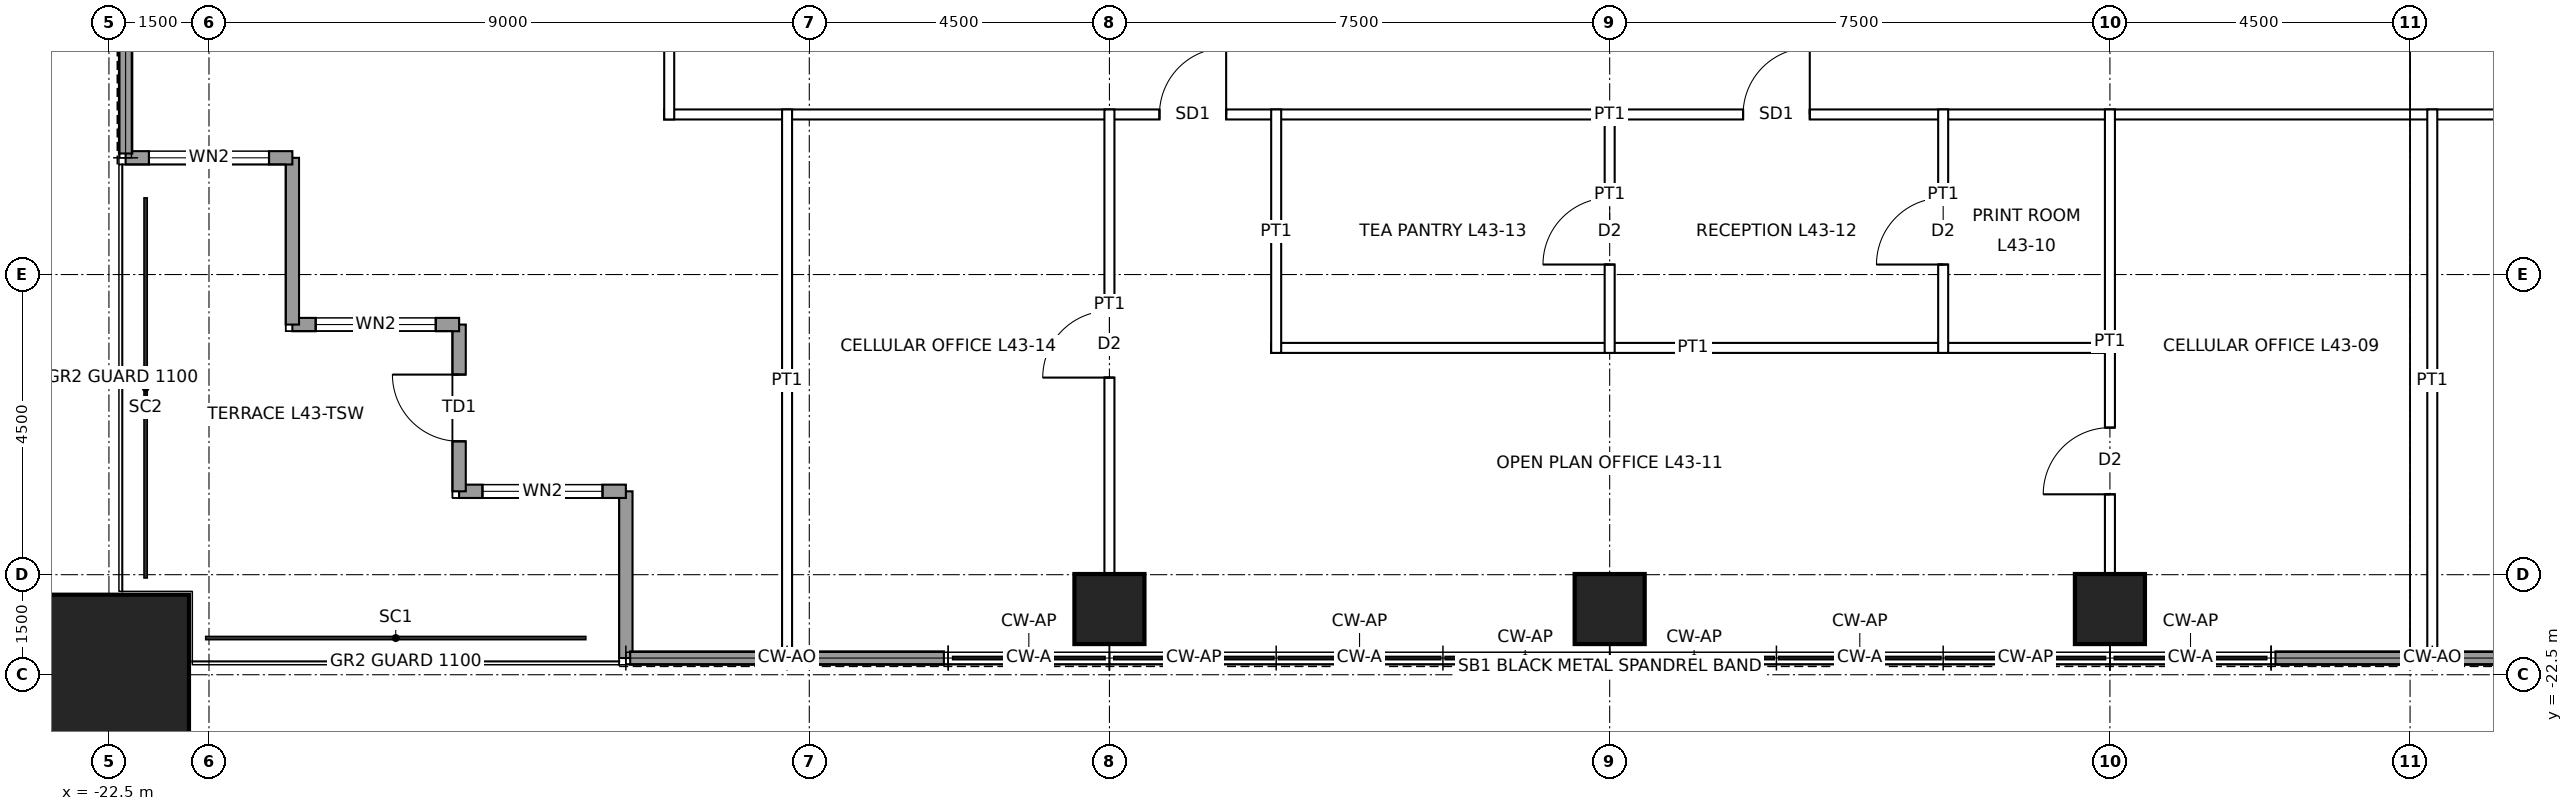
"""IFC4 building model, lengths in metres.
Left out: names, types, materials, properties, quantities, classifications, styles, units other than length and angle.
Written with IfcOpenShell. Run it as: python <this file> out.ifc"""

import sys

from ifc_helpers import new_model, si_unit, direction, frame, frame_2d, origin, origin_2d, place, context, subcontext, project, spatial, rectangle, hollow_rectangle, extrude, element, fill, save


model = new_model("IFC4")
c1 = context("Model", 3, precision=1e-05, world=origin(), true_north=direction((0.0, 1.0)))
c2 = subcontext(c1, "Body", "Model", "MODEL_VIEW")
j1 = project(units=[si_unit("LENGTHUNIT", "METRE"), si_unit("PLANEANGLEUNIT", "RADIAN")], contexts=[c1])
p1 = place(None, origin())
s1 = spatial("IfcSite", under=j1, at=p1, CompositionType="ELEMENT")
p2 = place(p1, origin())
s2 = spatial("IfcBuilding", under=s1, at=p2, CompositionType="ELEMENT")
p3 = place(p2, frame((0.0, 0.0, 205.9)))
s3 = spatial("IfcBuildingStorey", under=s2, at=p3, CompositionType="ELEMENT", Elevation=205.9)
p4 = place(p3, frame((-22.5, -22.5, 0.0), z_axis=(0.0, 0.0, 1.0), x_axis=(1.0, 0.0, 0.0)))
e1 = element("IfcColumn", 1, at=p4, inside=s3, PredefinedType="COLUMN", context=c2, shape_type="SweptSolid", body=[
    extrude(hollow_rectangle(XDim=2.4, YDim=2.4, WallThickness=0.12, at=origin_2d()), origin(), (0.0, 0.0, 1.0), 4.0),
])
for number, where, z_axis, x_axis in (
    (2, (7.5, -21.515, 0.0), (0.0, 0.0, 1.0), (1.0, 0.0, 0.0)),
    (3, (0.0, -21.515, 0.0), (0.0, 0.0, 1.0), (1.0, 0.0, 0.0)),
    (4, (-7.5, -21.515, 0.0), (0.0, 0.0, 1.0), (1.0, 0.0, 0.0)),
):
    element("IfcColumn", number, at=place(p3, frame(where, z_axis=z_axis, x_axis=x_axis)), inside=s3, PredefinedType="COLUMN", context=c2, shape_type="SweptSolid", body=[
        extrude(hollow_rectangle(XDim=1.05, YDim=1.05, WallThickness=0.07, at=origin_2d()), origin(), (0.0, 0.0, 1.0), 4.0),
    ])
p5 = place(p3, frame((-14.75, -22.25, 0.0), z_axis=(0.0, 0.0, 1.0), x_axis=(0.0, 1.0, 0.0)))
e5 = element("IfcWall", 5, at=p5, inside=s3, PredefinedType="SOLIDWALL", context=c2, shape_type="SweptSolid", body=[
    extrude(rectangle(XDim=2.5, YDim=0.2, at=frame_2d((1.25, 0.0))), origin(), (0.0, 0.0, 1.0), 3.85),
])
p6 = place(p3, frame((-14.75, -19.75, 0.0), z_axis=(0.0, 0.0, 1.0), x_axis=(-1.0, 0.0, 0.0)))
e6 = element("IfcWall", 6, at=p6, inside=s3, PredefinedType="SOLIDWALL", context=c2, shape_type="SweptSolid", body=[
    extrude(rectangle(XDim=2.5, YDim=0.2, at=frame_2d((1.25, 0.0))), origin(), (0.0, 0.0, 1.0), 3.85),
])
p7 = place(p6, frame((0.35, 0.0, 0.3)))
e7 = element("IfcOpeningElement", 7, at=p7, cuts=e6, PredefinedType="OPENING", context=c2, shape_type="SweptSolid", body=[
    extrude(rectangle(XDim=1.8, YDim=2.4, at=frame_2d((0.9, 1.2))), frame((0.0, 0.11, 0.0), z_axis=(0.0, -1.0, 0.0), x_axis=(1.0, 0.0, 0.0)), (0.0, 0.0, 1.0), 0.22),
])
p8 = place(p3, frame((-17.25, -19.75, 0.0), z_axis=(0.0, 0.0, 1.0), x_axis=(0.0, 1.0, 0.0)))
e8 = element("IfcWall", 8, at=p8, inside=s3, PredefinedType="SOLIDWALL", context=c2, shape_type="SweptSolid", body=[
    extrude(rectangle(XDim=2.5, YDim=0.2, at=frame_2d((1.25, 0.0))), origin(), (0.0, 0.0, 1.0), 3.85),
])
p9 = place(p8, frame((0.75, 0.0, 0.0)))
e9 = element("IfcOpeningElement", 9, at=p9, cuts=e8, PredefinedType="OPENING", context=c2, shape_type="SweptSolid", body=[
    extrude(rectangle(XDim=1.0, YDim=2.4, at=frame_2d((0.5, 1.2))), frame((0.0, 0.11, 0.0), z_axis=(0.0, -1.0, 0.0), x_axis=(1.0, 0.0, 0.0)), (0.0, 0.0, 1.0), 0.22),
])
p10 = place(p3, frame((-17.25, -17.25, 0.0), z_axis=(0.0, 0.0, 1.0), x_axis=(-1.0, 0.0, 0.0)))
e10 = element("IfcWall", 10, at=p10, inside=s3, PredefinedType="SOLIDWALL", context=c2, shape_type="SweptSolid", body=[
    extrude(rectangle(XDim=2.5, YDim=0.2, at=frame_2d((1.25, 0.0))), origin(), (0.0, 0.0, 1.0), 3.85),
])
p11 = place(p10, frame((0.35, 0.0, 0.3)))
e11 = element("IfcOpeningElement", 11, at=p11, cuts=e10, PredefinedType="OPENING", context=c2, shape_type="SweptSolid", body=[
    extrude(rectangle(XDim=1.8, YDim=2.4, at=frame_2d((0.9, 1.2))), frame((0.0, 0.11, 0.0), z_axis=(0.0, -1.0, 0.0), x_axis=(1.0, 0.0, 0.0)), (0.0, 0.0, 1.0), 0.22),
])
p12 = place(p3, frame((-19.75, -17.25, 0.0), z_axis=(0.0, 0.0, 1.0), x_axis=(0.0, 1.0, 0.0)))
e12 = element("IfcWall", 12, at=p12, inside=s3, PredefinedType="SOLIDWALL", context=c2, shape_type="SweptSolid", body=[
    extrude(rectangle(XDim=2.5, YDim=0.2, at=frame_2d((1.25, 0.0))), origin(), (0.0, 0.0, 1.0), 3.85),
])
p13 = place(p3, frame((-19.75, -14.75, 0.0), z_axis=(0.0, 0.0, 1.0), x_axis=(-1.0, 0.0, 0.0)))
e13 = element("IfcWall", 13, at=p13, inside=s3, PredefinedType="SOLIDWALL", context=c2, shape_type="SweptSolid", body=[
    extrude(rectangle(XDim=2.5, YDim=0.2, at=frame_2d((1.25, 0.0))), origin(), (0.0, 0.0, 1.0), 3.85),
])
p14 = place(p13, frame((0.35, 0.0, 0.3)))
e14 = element("IfcOpeningElement", 14, at=p14, cuts=e13, PredefinedType="OPENING", context=c2, shape_type="SweptSolid", body=[
    extrude(rectangle(XDim=1.8, YDim=2.4, at=frame_2d((0.9, 1.2))), frame((0.0, 0.11, 0.0), z_axis=(0.0, -1.0, 0.0), x_axis=(1.0, 0.0, 0.0)), (0.0, 0.0, 1.0), 0.22),
])
for number, where, z_axis, x_axis in (
    (15, (14.685, -22.25, 0.0), (0.0, 0.0, 1.0), (-1.0, 0.0, 0.0)),
    (16, (12.301, -22.25, 0.0), (0.0, 0.0, 1.0), (-1.0, 0.0, 0.0)),
    (17, (-9.982, -22.25, 0.0), (0.0, 0.0, 1.0), (-1.0, 0.0, 0.0)),
    (18, (-12.366, -22.25, 0.0), (0.0, 0.0, 1.0), (-1.0, 0.0, 0.0)),
    (19, (-22.25, -14.685, 0.0), (0.0, 0.0, 1.0), (0.0, 1.0, 0.0)),
):
    element("IfcWall", number, at=place(p3, frame(where, z_axis=z_axis, x_axis=x_axis)), inside=s3, PredefinedType="SOLIDWALL", context=c2, shape_type="SweptSolid", body=[
        extrude(rectangle(XDim=2.319, YDim=0.2, at=frame_2d((1.16, 0.0))), origin(), (0.0, 0.0, 1.0), 3.85),
    ])
p15 = place(p3, frame((-5.075, -17.6, 0.0), z_axis=(0.0, 0.0, 1.0), x_axis=(1.0, 0.0, 0.0)))
e20 = element("IfcWall", 20, at=p15, inside=s3, PredefinedType="PARTITIONING", context=c2, shape_type="SweptSolid", body=[
    extrude(rectangle(XDim=12.65, YDim=0.15, at=frame_2d((6.325, 0.0))), origin(), (0.0, 0.0, 1.0), 3.85),
])
p16 = place(p3, frame((-14.175, -14.1, 0.0), z_axis=(0.0, 0.0, 1.0), x_axis=(1.0, 0.0, 0.0)))
e21 = element("IfcWall", 21, at=p16, inside=s3, PredefinedType="PARTITIONING", context=c2, shape_type="SweptSolid", body=[
    extrude(rectangle(XDim=28.35, YDim=0.15, at=frame_2d((14.175, 0.0))), origin(), (0.0, 0.0, 1.0), 3.85),
])
p17 = place(p16, frame((7.425, 0.0, 0.0)))
e22 = element("IfcOpeningElement", 22, at=p17, cuts=e21, PredefinedType="OPENING", context=c2, shape_type="SweptSolid", body=[
    extrude(rectangle(XDim=1.0, YDim=2.4, at=frame_2d((0.5, 1.2))), frame((0.0, 0.085, 0.0), z_axis=(0.0, -1.0, 0.0), x_axis=(1.0, 0.0, 0.0)), (0.0, 0.0, 1.0), 0.17),
])
p18 = place(p16, frame((16.175, 0.0, 0.0)))
e23 = element("IfcOpeningElement", 23, at=p18, cuts=e21, PredefinedType="OPENING", context=c2, shape_type="SweptSolid", body=[
    extrude(rectangle(XDim=1.0, YDim=2.4, at=frame_2d((0.5, 1.2))), frame((0.0, 0.085, 0.0), z_axis=(0.0, -1.0, 0.0), x_axis=(1.0, 0.0, 0.0)), (0.0, 0.0, 1.0), 0.17),
])
p19 = place(p3, frame((-14.1, -14.175, 0.0), z_axis=(0.0, 0.0, 1.0), x_axis=(0.0, 1.0, 0.0)))
e24 = element("IfcWall", 24, at=p19, inside=s3, PredefinedType="PARTITIONING", context=c2, shape_type="SweptSolid", body=[
    extrude(rectangle(XDim=28.35, YDim=0.15, at=frame_2d((14.175, 0.0))), origin(), (0.0, 0.0, 1.0), 3.85),
])
p20 = place(p19, frame((12.075, 0.0, 0.0)))
e25 = element("IfcOpeningElement", 25, at=p20, cuts=e24, PredefinedType="OPENING", context=c2, shape_type="SweptSolid", body=[
    extrude(rectangle(XDim=1.0, YDim=2.4, at=frame_2d((0.5, 1.2))), frame((0.0, 0.085, 0.0), z_axis=(0.0, -1.0, 0.0), x_axis=(1.0, 0.0, 0.0)), (0.0, 0.0, 1.0), 0.17),
])
p21 = place(p19, frame((2.875, 0.0, 0.0)))
e26 = element("IfcOpeningElement", 26, at=p21, cuts=e24, PredefinedType="OPENING", context=c2, shape_type="SweptSolid", body=[
    extrude(rectangle(XDim=1.0, YDim=2.4, at=frame_2d((0.5, 1.2))), frame((0.0, 0.085, 0.0), z_axis=(0.0, -1.0, 0.0), x_axis=(1.0, 0.0, 0.0)), (0.0, 0.0, 1.0), 0.17),
])
p22 = place(p3, frame((-12.333, -22.15, 0.0), z_axis=(0.0, 0.0, 1.0), x_axis=(0.0, 1.0, 0.0)))
e27 = element("IfcWall", 27, at=p22, inside=s3, PredefinedType="PARTITIONING", context=c2, shape_type="SweptSolid", body=[
    extrude(rectangle(XDim=8.125, YDim=0.15, at=frame_2d((4.062, 0.0))), origin(), (0.0, 0.0, 1.0), 3.85),
])
p23 = place(p3, frame((-7.5, -20.99, 0.0), z_axis=(0.0, 0.0, 1.0), x_axis=(0.0, 1.0, 0.0)))
e28 = element("IfcWall", 28, at=p23, inside=s3, PredefinedType="PARTITIONING", context=c2, shape_type="SweptSolid", body=[
    extrude(rectangle(XDim=6.965, YDim=0.15, at=frame_2d((3.482, 0.0))), origin(), (0.0, 0.0, 1.0), 3.238),
])
p24 = place(p23, frame((2.945, 0.0, 0.0)))
e29 = element("IfcOpeningElement", 29, at=p24, cuts=e28, PredefinedType="OPENING", context=c2, shape_type="SweptSolid", body=[
    extrude(rectangle(XDim=1.0, YDim=2.1, at=frame_2d((0.5, 1.05))), frame((0.0, 0.085, 0.0), z_axis=(0.0, -1.0, 0.0), x_axis=(1.0, 0.0, 0.0)), (0.0, 0.0, 1.0), 0.17),
])
p25 = place(p3, frame((-5.0, -17.675, 0.0), z_axis=(0.0, 0.0, 1.0), x_axis=(0.0, 1.0, 0.0)))
e30 = element("IfcWall", 30, at=p25, inside=s3, PredefinedType="PARTITIONING", context=c2, shape_type="SweptSolid", body=[
    extrude(rectangle(XDim=3.65, YDim=0.15, at=frame_2d((1.825, 0.0))), origin(), (0.0, 0.0, 1.0), 3.85),
])
p26 = place(p3, frame((0.0, -17.675, 0.0), z_axis=(0.0, 0.0, 1.0), x_axis=(0.0, 1.0, 0.0)))
e31 = element("IfcWall", 31, at=p26, inside=s3, PredefinedType="PARTITIONING", context=c2, shape_type="SweptSolid", body=[
    extrude(rectangle(XDim=3.65, YDim=0.15, at=frame_2d((1.825, 0.0))), origin(), (0.0, 0.0, 1.0), 3.238),
])
p27 = place(p26, frame((1.325, 0.0, 0.0)))
e32 = element("IfcOpeningElement", 32, at=p27, cuts=e31, PredefinedType="OPENING", context=c2, shape_type="SweptSolid", body=[
    extrude(rectangle(XDim=1.0, YDim=2.1, at=frame_2d((0.5, 1.05))), frame((0.0, 0.085, 0.0), z_axis=(0.0, -1.0, 0.0), x_axis=(1.0, 0.0, 0.0)), (0.0, 0.0, 1.0), 0.17),
])
p28 = place(p3, frame((5.0, -17.675, 0.0), z_axis=(0.0, 0.0, 1.0), x_axis=(0.0, 1.0, 0.0)))
e33 = element("IfcWall", 33, at=p28, inside=s3, PredefinedType="PARTITIONING", context=c2, shape_type="SweptSolid", body=[
    extrude(rectangle(XDim=3.65, YDim=0.15, at=frame_2d((1.825, 0.0))), origin(), (0.0, 0.0, 1.0), 3.85),
])
p29 = place(p28, frame((1.325, 0.0, 0.0)))
e34 = element("IfcOpeningElement", 34, at=p29, cuts=e33, PredefinedType="OPENING", context=c2, shape_type="SweptSolid", body=[
    extrude(rectangle(XDim=1.0, YDim=2.1, at=frame_2d((0.5, 1.05))), frame((0.0, 0.085, 0.0), z_axis=(0.0, -1.0, 0.0), x_axis=(1.0, 0.0, 0.0)), (0.0, 0.0, 1.0), 0.17),
])
p30 = place(p3, frame((7.5, -20.99, 0.0), z_axis=(0.0, 0.0, 1.0), x_axis=(0.0, 1.0, 0.0)))
e35 = element("IfcWall", 35, at=p30, inside=s3, PredefinedType="PARTITIONING", context=c2, shape_type="SweptSolid", body=[
    extrude(rectangle(XDim=6.965, YDim=0.15, at=frame_2d((3.482, 0.0))), origin(), (0.0, 0.0, 1.0), 3.238),
])
p31 = place(p30, frame((1.195, 0.0, 0.0)))
e36 = element("IfcOpeningElement", 36, at=p31, cuts=e35, PredefinedType="OPENING", context=c2, shape_type="SweptSolid", body=[
    extrude(rectangle(XDim=1.0, YDim=2.1, at=frame_2d((0.5, 1.05))), frame((0.0, 0.085, 0.0), z_axis=(0.0, -1.0, 0.0), x_axis=(1.0, 0.0, 0.0)), (0.0, 0.0, 1.0), 0.17),
])
p32 = place(p3, frame((12.333, -22.15, 0.0), z_axis=(0.0, 0.0, 1.0), x_axis=(0.0, 1.0, 0.0)))
e37 = element("IfcWall", 37, at=p32, inside=s3, PredefinedType="PARTITIONING", context=c2, shape_type="SweptSolid", body=[
    extrude(rectangle(XDim=8.125, YDim=0.15, at=frame_2d((4.062, 0.0))), origin(), (0.0, 0.0, 1.0), 3.85),
])
p33 = place(p7, origin())
e38 = element("IfcWindow", 38, at=p33, inside=s3, PartitioningType="SINGLE_PANEL", PredefinedType="WINDOW", context=c2, shape_type="SweptSolid", body=[
    extrude(rectangle(XDim=1.8, YDim=2.4, at=frame_2d((0.9, 1.2))), frame((0.0, 0.03, 0.0), z_axis=(0.0, -1.0, 0.0), x_axis=(1.0, 0.0, 0.0)), (0.0, 0.0, 1.0), 0.06),
])
fill(e7, e38)
p34 = place(p9, origin())
e39 = element("IfcDoor", 39, at=p34, inside=s3, OperationType="SINGLE_SWING_RIGHT", PredefinedType="DOOR", context=c2, shape_type="SweptSolid", body=[
    extrude(rectangle(XDim=1.0, YDim=2.4, at=frame_2d((0.5, 1.2))), frame((0.0, 0.025, 0.0), z_axis=(0.0, -1.0, 0.0), x_axis=(1.0, 0.0, 0.0)), (0.0, 0.0, 1.0), 0.05),
])
fill(e9, e39)
p35 = place(p11, origin())
e40 = element("IfcWindow", 40, at=p35, inside=s3, PartitioningType="SINGLE_PANEL", PredefinedType="WINDOW", context=c2, shape_type="SweptSolid", body=[
    extrude(rectangle(XDim=1.8, YDim=2.4, at=frame_2d((0.9, 1.2))), frame((0.0, 0.03, 0.0), z_axis=(0.0, -1.0, 0.0), x_axis=(1.0, 0.0, 0.0)), (0.0, 0.0, 1.0), 0.06),
])
fill(e11, e40)
p36 = place(p14, origin())
e41 = element("IfcWindow", 41, at=p36, inside=s3, PartitioningType="SINGLE_PANEL", PredefinedType="WINDOW", context=c2, shape_type="SweptSolid", body=[
    extrude(rectangle(XDim=1.8, YDim=2.4, at=frame_2d((0.9, 1.2))), frame((0.0, 0.03, 0.0), z_axis=(0.0, -1.0, 0.0), x_axis=(1.0, 0.0, 0.0)), (0.0, 0.0, 1.0), 0.06),
])
fill(e14, e41)
p37 = place(p31, origin())
e42 = element("IfcDoor", 42, at=p37, inside=s3, OperationType="SINGLE_SWING_LEFT", PredefinedType="DOOR", context=c2, shape_type="SweptSolid", body=[
    extrude(rectangle(XDim=1.0, YDim=2.1, at=frame_2d((0.5, 1.05))), frame((0.0, 0.025, 0.0), z_axis=(0.0, -1.0, 0.0), x_axis=(1.0, 0.0, 0.0)), (0.0, 0.0, 1.0), 0.05),
])
fill(e36, e42)
p38 = place(p29, origin())
e43 = element("IfcDoor", 43, at=p38, inside=s3, OperationType="SINGLE_SWING_LEFT", PredefinedType="DOOR", context=c2, shape_type="SweptSolid", body=[
    extrude(rectangle(XDim=1.0, YDim=2.1, at=frame_2d((0.5, 1.05))), frame((0.0, 0.025, 0.0), z_axis=(0.0, -1.0, 0.0), x_axis=(1.0, 0.0, 0.0)), (0.0, 0.0, 1.0), 0.05),
])
fill(e34, e43)
p39 = place(p17, origin())
e44 = element("IfcDoor", 44, at=p39, inside=s3, OperationType="SINGLE_SWING_RIGHT", PredefinedType="DOOR", context=c2, shape_type="SweptSolid", body=[
    extrude(rectangle(XDim=1.0, YDim=2.4, at=frame_2d((0.5, 1.2))), frame((0.0, 0.025, 0.0), z_axis=(0.0, -1.0, 0.0), x_axis=(1.0, 0.0, 0.0)), (0.0, 0.0, 1.0), 0.05),
])
fill(e22, e44)
p40 = place(p18, origin())
e45 = element("IfcDoor", 45, at=p40, inside=s3, OperationType="SINGLE_SWING_RIGHT", PredefinedType="DOOR", context=c2, shape_type="SweptSolid", body=[
    extrude(rectangle(XDim=1.0, YDim=2.4, at=frame_2d((0.5, 1.2))), frame((0.0, 0.025, 0.0), z_axis=(0.0, -1.0, 0.0), x_axis=(1.0, 0.0, 0.0)), (0.0, 0.0, 1.0), 0.05),
])
fill(e23, e45)
p41 = place(p27, origin())
e46 = element("IfcDoor", 46, at=p41, inside=s3, OperationType="SINGLE_SWING_LEFT", PredefinedType="DOOR", context=c2, shape_type="SweptSolid", body=[
    extrude(rectangle(XDim=1.0, YDim=2.1, at=frame_2d((0.5, 1.05))), frame((0.0, 0.025, 0.0), z_axis=(0.0, -1.0, 0.0), x_axis=(1.0, 0.0, 0.0)), (0.0, 0.0, 1.0), 0.05),
])
fill(e32, e46)
p42 = place(p24, origin())
e47 = element("IfcDoor", 47, at=p42, inside=s3, OperationType="SINGLE_SWING_LEFT", PredefinedType="DOOR", context=c2, shape_type="SweptSolid", body=[
    extrude(rectangle(XDim=1.0, YDim=2.1, at=frame_2d((0.5, 1.05))), frame((0.0, 0.025, 0.0), z_axis=(0.0, -1.0, 0.0), x_axis=(1.0, 0.0, 0.0)), (0.0, 0.0, 1.0), 0.05),
])
fill(e29, e47)
save(model, sys.argv[1])
